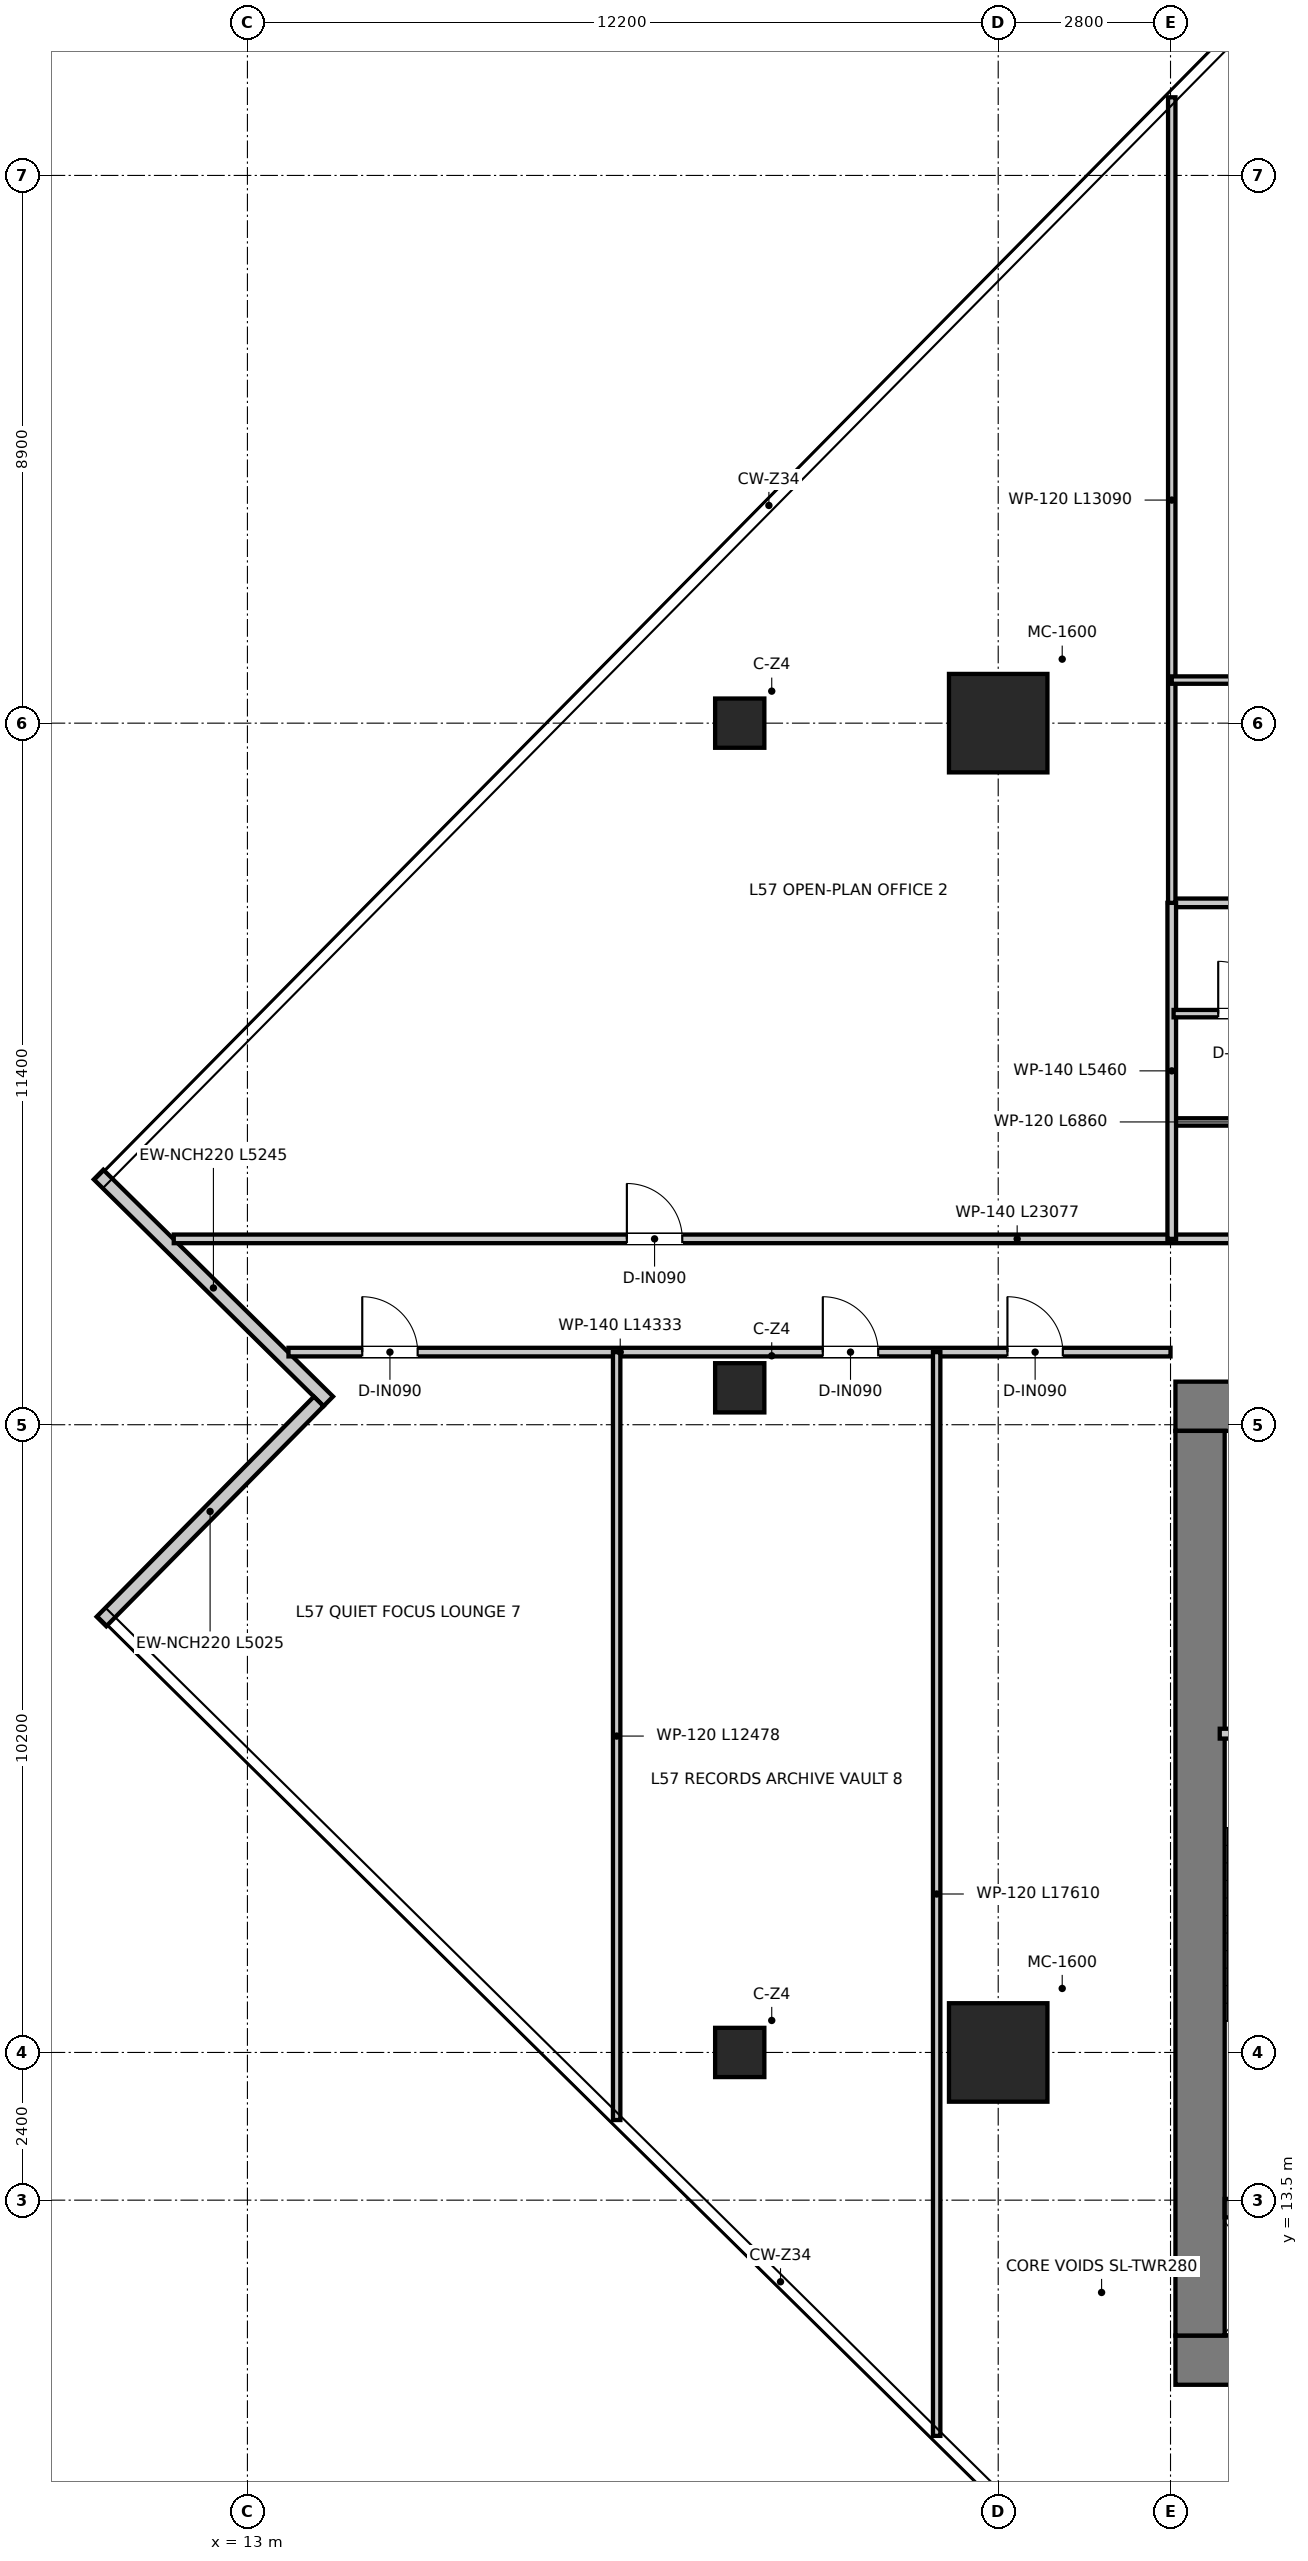
"""IFC4 building model, lengths in metres.
Left out: names, types, materials, properties, quantities, classifications, styles, units other than length and angle.
Written with IfcOpenShell. Run it as: python <this file> out.ifc"""

import sys

from ifc_helpers import new_model, si_unit, direction, frame, frame_2d, origin, origin_2d, place, context, subcontext, project, spatial, rectangle, extrude, source, transform, mapped, element, fill, save


model = new_model("IFC4")
c1 = context("Model", 3, precision=1e-05, world=origin(), true_north=direction((0.0, 1.0)))
c2 = subcontext(c1, "Body", "Model", "MODEL_VIEW")
j1 = project(units=[si_unit("LENGTHUNIT", "METRE"), si_unit("PLANEANGLEUNIT", "RADIAN")], contexts=[c1])
p1 = place(None, origin())
s1 = spatial("IfcSite", under=j1, at=p1, CompositionType="ELEMENT")
p2 = place(p1, origin())
s2 = spatial("IfcBuilding", under=s1, at=p2, CompositionType="ELEMENT")
p3 = place(p2, frame((0.0, 0.0, 234.95)))
s3 = spatial("IfcBuildingStorey", under=s2, at=p3, CompositionType="ELEMENT", Elevation=234.95)
p4 = place(p3, frame((28.08, 10.9, 0.0), z_axis=(0.0, 0.0, 1.0), x_axis=(1.0, 0.0, 0.0)))
e1 = element("IfcWall", 1, at=p4, inside=s3, PredefinedType="SHEAR", context=c2, shape_type="SweptSolid", body=[
    extrude(rectangle(XDim=15.84, YDim=0.8, at=frame_2d((7.92, 0.0))), origin(), (0.0, 0.0, 1.0), 3.95),
])
p5 = place(p3, frame((28.08, 26.4, 0.0), z_axis=(0.0, 0.0, 1.0), x_axis=(1.0, 0.0, 0.0)))
e2 = element("IfcWall", 2, at=p5, inside=s3, PredefinedType="SHEAR", context=c2, shape_type="SweptSolid", body=[
    extrude(rectangle(XDim=15.84, YDim=0.8, at=frame_2d((7.92, 0.0))), origin(), (0.0, 0.0, 1.0), 3.95),
])
p6 = place(p5, frame((7.22, 0.0, 0.0)))
e3 = element("IfcOpeningElement", 3, at=p6, cuts=e2, PredefinedType="OPENING", context=c2, shape_type="SweptSolid", body=[
    extrude(rectangle(XDim=1.4, YDim=2.2, at=frame_2d((0.7, 1.1))), frame((0.0, 0.41, 0.0), z_axis=(0.0, -1.0, 0.0), x_axis=(1.0, 0.0, 0.0)), (0.0, 0.0, 1.0), 0.82),
])
p7 = place(p5, frame((1.775, 0.0, 0.0)))
e4 = element("IfcOpeningElement", 4, at=p7, cuts=e2, PredefinedType="OPENING", context=c2, shape_type="SweptSolid", body=[
    extrude(rectangle(XDim=1.05, YDim=2.1, at=frame_2d((0.525, 1.05))), frame((0.0, 0.41, 0.0), z_axis=(0.0, -1.0, 0.0), x_axis=(1.0, 0.0, 0.0)), (0.0, 0.0, 1.0), 0.82),
])
p8 = place(p5, frame((13.015, 0.0, 0.0)))
e5 = element("IfcOpeningElement", 5, at=p8, cuts=e2, PredefinedType="OPENING", context=c2, shape_type="SweptSolid", body=[
    extrude(rectangle(XDim=1.05, YDim=2.1, at=frame_2d((0.525, 1.05))), frame((0.0, 0.41, 0.0), z_axis=(0.0, -1.0, 0.0), x_axis=(1.0, 0.0, 0.0)), (0.0, 0.0, 1.0), 0.82),
])
p9 = place(p3, frame((28.48, 11.3, 0.0), z_axis=(0.0, 0.0, 1.0), x_axis=(0.0, 1.0, 0.0)))
e6 = element("IfcWall", 6, at=p9, inside=s3, PredefinedType="SHEAR", context=c2, shape_type="SweptSolid", body=[
    extrude(rectangle(XDim=14.7, YDim=0.8, at=frame_2d((7.35, 0.0))), origin(), (0.0, 0.0, 1.0), 3.95),
])
p10 = place(p3, frame((28.88, 13.37, 0.0), z_axis=(0.0, 0.0, 1.0), x_axis=(1.0, 0.0, 0.0)))
e7 = element("IfcWall", 7, at=p10, inside=s3, PredefinedType="SHEAR", context=c2, shape_type="SweptSolid", body=[
    extrude(rectangle(XDim=3.1, YDim=0.3, at=frame_2d((1.55, 0.0))), origin(), (0.0, 0.0, 1.0), 3.95),
])
m1 = source(origin(), c2, "Body", "SweptSolid", [
    extrude(rectangle(XDim=1.6, YDim=1.6, at=origin_2d()), origin(), (0.0, 0.0, 1.0), 3.95),
])
for number, where, z_axis, x_axis in (
    (8, (25.2, 15.9, 0.0), (0.0, 0.0, 1.0), (1.0, 0.0, 0.0)),
    (9, (25.2, 37.5, 0.0), (0.0, 0.0, 1.0), (1.0, 0.0, 0.0)),
):
    element("IfcColumn", number, at=place(p3, frame(where, z_axis=z_axis, x_axis=x_axis)), inside=s3, PredefinedType="USERDEFINED", context=c2, shape_type="MappedRepresentation", body=[
        mapped(m1, transform((0.0, 0.0, 0.0), x_axis=(1.0, 0.0, 0.0), y_axis=(0.0, 1.0, 0.0), z_axis=(0.0, 0.0, 1.0), scale=1.0)),
    ])
m2 = source(origin(), c2, "Body", "SweptSolid", [
    extrude(rectangle(XDim=0.8, YDim=0.8, at=origin_2d()), origin(), (0.0, 0.0, 1.0), 3.95),
])
for number, where, z_axis, x_axis in (
    (10, (21.0, 15.9, 0.0), (0.0, 0.0, 1.0), (1.0, 0.0, 0.0)),
    (11, (21.0, 26.7, 0.0), (0.0, 0.0, 1.0), (1.0, 0.0, 0.0)),
    (12, (21.0, 37.5, 0.0), (0.0, 0.0, 1.0), (1.0, 0.0, 0.0)),
):
    element("IfcColumn", number, at=place(p3, frame(where, z_axis=z_axis, x_axis=x_axis)), inside=s3, PredefinedType="COLUMN", context=c2, shape_type="MappedRepresentation", body=[
        mapped(m2, transform((0.0, 0.0, 0.0), x_axis=(1.0, 0.0, 0.0), y_axis=(0.0, 1.0, 0.0), z_axis=(0.0, 0.0, 1.0), scale=1.0)),
    ])
p11 = place(p3, frame((10.581, 30.165, 0.0), z_axis=(0.0, 0.0, 1.0), x_axis=(0.711699894533, -0.702483636906, 0.0)))
e13 = element("IfcWall", 13, at=p11, inside=s3, PredefinedType="ELEMENTEDWALL", context=c2, shape_type="SweptSolid", body=[
    extrude(rectangle(XDim=5.245, YDim=0.22, at=frame_2d((2.623, 0.0))), origin(), (0.0, 0.0, 1.0), 3.67),
])
p12 = place(p3, frame((14.158, 26.479, 0.0), z_axis=(0.0, 0.0, 1.0), x_axis=(-0.702451626199, -0.711731489292, 0.0)))
e14 = element("IfcWall", 14, at=p12, inside=s3, PredefinedType="ELEMENTEDWALL", context=c2, shape_type="SweptSolid", body=[
    extrude(rectangle(XDim=5.025, YDim=0.22, at=frame_2d((2.512, 0.0))), origin(), (0.0, 0.0, 1.0), 3.67),
])
p13 = place(p3, frame((28.8, 21.08, 0.0), z_axis=(0.0, 0.0, 1.0), x_axis=(1.0, 0.0, 0.0)))
e15 = element("IfcWall", 15, at=p13, inside=s3, PredefinedType="PARTITIONING", context=c2, shape_type="SweptSolid", body=[
    extrude(rectangle(XDim=3.16, YDim=0.16, at=frame_2d((1.58, 0.0))), origin(), (0.0, 0.0, 1.0), 3.67),
])
p14 = place(p13, frame((1.055, 0.0, 0.0)))
e16 = element("IfcOpeningElement", 16, at=p14, cuts=e15, PredefinedType="OPENING", context=c2, shape_type="SweptSolid", body=[
    extrude(rectangle(XDim=1.05, YDim=2.1, at=frame_2d((0.525, 1.05))), frame((0.0, 0.09, 0.0), z_axis=(0.0, -1.0, 0.0), x_axis=(1.0, 0.0, 0.0)), (0.0, 0.0, 1.0), 0.18),
])
p15 = place(p3, frame((11.803, 29.12, 0.0), z_axis=(0.0, 0.0, 1.0), x_axis=(1.0, 0.0, 0.0)))
e17 = element("IfcWall", 17, at=p15, inside=s3, PredefinedType="PARTITIONING", context=c2, shape_type="SweptSolid", body=[
    extrude(rectangle(XDim=23.077, YDim=0.14, at=frame_2d((11.538, 0.0))), origin(), (0.0, 0.0, 1.0), 3.03),
])
p16 = place(p15, frame((19.147, 0.0, 0.0)))
e18 = element("IfcOpeningElement", 18, at=p16, cuts=e17, PredefinedType="OPENING", context=c2, shape_type="SweptSolid", body=[
    extrude(rectangle(XDim=0.9, YDim=2.1, at=frame_2d((0.45, 1.05))), frame((0.0, 0.08, 0.0), z_axis=(0.0, -1.0, 0.0), x_axis=(1.0, 0.0, 0.0)), (0.0, 0.0, 1.0), 0.16),
])
p17 = place(p15, frame((7.363, 0.0, 0.0)))
e19 = element("IfcOpeningElement", 19, at=p17, cuts=e17, PredefinedType="OPENING", context=c2, shape_type="SweptSolid", body=[
    extrude(rectangle(XDim=0.9, YDim=2.1, at=frame_2d((0.45, 1.05))), frame((0.0, 0.08, 0.0), z_axis=(0.0, -1.0, 0.0), x_axis=(1.0, 0.0, 0.0)), (0.0, 0.0, 1.0), 0.16),
])
p18 = place(p3, frame((13.667, 27.28, 0.0), z_axis=(0.0, 0.0, 1.0), x_axis=(1.0, 0.0, 0.0)))
e20 = element("IfcWall", 20, at=p18, inside=s3, PredefinedType="PARTITIONING", context=c2, shape_type="SweptSolid", body=[
    extrude(rectangle(XDim=14.333, YDim=0.14, at=frame_2d((7.166, 0.0))), origin(), (0.0, 0.0, 1.0), 3.03),
])
p19 = place(p18, frame((1.198, 0.0, 0.0)))
e21 = element("IfcOpeningElement", 21, at=p19, cuts=e20, PredefinedType="OPENING", context=c2, shape_type="SweptSolid", body=[
    extrude(rectangle(XDim=0.9, YDim=2.1, at=frame_2d((0.45, 1.05))), frame((0.0, 0.08, 0.0), z_axis=(0.0, -1.0, 0.0), x_axis=(1.0, 0.0, 0.0)), (0.0, 0.0, 1.0), 0.16),
])
p20 = place(p18, frame((8.683, 0.0, 0.0)))
e22 = element("IfcOpeningElement", 22, at=p20, cuts=e20, PredefinedType="OPENING", context=c2, shape_type="SweptSolid", body=[
    extrude(rectangle(XDim=0.9, YDim=2.1, at=frame_2d((0.45, 1.05))), frame((0.0, 0.08, 0.0), z_axis=(0.0, -1.0, 0.0), x_axis=(1.0, 0.0, 0.0)), (0.0, 0.0, 1.0), 0.16),
])
p21 = place(p18, frame((11.683, 0.0, 0.0)))
e23 = element("IfcOpeningElement", 23, at=p21, cuts=e20, PredefinedType="OPENING", context=c2, shape_type="SweptSolid", body=[
    extrude(rectangle(XDim=0.9, YDim=2.1, at=frame_2d((0.45, 1.05))), frame((0.0, 0.08, 0.0), z_axis=(0.0, -1.0, 0.0), x_axis=(1.0, 0.0, 0.0)), (0.0, 0.0, 1.0), 0.16),
])
p22 = place(p3, frame((28.02, 31.02, 0.0), z_axis=(0.0, 0.0, 1.0), x_axis=(1.0, 0.0, 0.0)))
e24 = element("IfcWall", 24, at=p22, inside=s3, PredefinedType="PARTITIONING", context=c2, shape_type="SweptSolid", body=[
    extrude(rectangle(XDim=6.86, YDim=0.12, at=frame_2d((3.43, 0.0))), origin(), (0.0, 0.0, 1.0), 3.18),
])
p23 = place(p3, frame((28.02, 34.58, 0.0), z_axis=(0.0, 0.0, 1.0), x_axis=(1.0, 0.0, 0.0)))
e25 = element("IfcWall", 25, at=p23, inside=s3, PredefinedType="PARTITIONING", context=c2, shape_type="SweptSolid", body=[
    extrude(rectangle(XDim=6.86, YDim=0.14, at=frame_2d((3.43, 0.0))), origin(), (0.0, 0.0, 1.0), 3.18),
])
p24 = place(p3, frame((28.02, 29.12, 0.0), z_axis=(0.0, 0.0, 1.0), x_axis=(0.0, 1.0, 0.0)))
e26 = element("IfcWall", 26, at=p24, inside=s3, PredefinedType="PARTITIONING", context=c2, shape_type="SweptSolid", body=[
    extrude(rectangle(XDim=5.46, YDim=0.14, at=frame_2d((2.73, 0.0))), origin(), (0.0, 0.0, 1.0), 3.37),
])
p25 = place(p3, frame((28.05, 32.78, 0.0), z_axis=(0.0, 0.0, 1.0), x_axis=(1.0, 0.0, 0.0)))
e27 = element("IfcWall", 27, at=p25, inside=s3, PredefinedType="PARTITIONING", context=c2, shape_type="SweptSolid", body=[
    extrude(rectangle(XDim=6.8, YDim=0.12, at=frame_2d((3.4, 0.0))), origin(), (0.0, 0.0, 1.0), 3.18),
])
p26 = place(p25, frame((0.725, 0.0, 0.0)))
e28 = element("IfcOpeningElement", 28, at=p26, cuts=e27, PredefinedType="OPENING", context=c2, shape_type="SweptSolid", body=[
    extrude(rectangle(XDim=0.85, YDim=2.1, at=frame_2d((0.425, 1.05))), frame((0.0, 0.07, 0.0), z_axis=(0.0, -1.0, 0.0), x_axis=(1.0, 0.0, 0.0)), (0.0, 0.0, 1.0), 0.14),
])
p27 = place(p25, frame((3.065, 0.0, 0.0)))
e29 = element("IfcOpeningElement", 29, at=p27, cuts=e27, PredefinedType="OPENING", context=c2, shape_type="SweptSolid", body=[
    extrude(rectangle(XDim=0.85, YDim=2.1, at=frame_2d((0.425, 1.05))), frame((0.0, 0.07, 0.0), z_axis=(0.0, -1.0, 0.0), x_axis=(1.0, 0.0, 0.0)), (0.0, 0.0, 1.0), 0.14),
])
p28 = place(p25, frame((5.25, 0.0, 0.0)))
e30 = element("IfcOpeningElement", 30, at=p28, cuts=e27, PredefinedType="OPENING", context=c2, shape_type="SweptSolid", body=[
    extrude(rectangle(XDim=0.9, YDim=2.1, at=frame_2d((0.45, 1.05))), frame((0.0, 0.07, 0.0), z_axis=(0.0, -1.0, 0.0), x_axis=(1.0, 0.0, 0.0)), (0.0, 0.0, 1.0), 0.14),
])
p29 = place(p3, frame((28.02, 34.58, 0.0), z_axis=(0.0, 0.0, 1.0), x_axis=(0.0, 1.0, 0.0)))
e31 = element("IfcWall", 31, at=p29, inside=s3, PredefinedType="PARTITIONING", context=c2, shape_type="SweptSolid", body=[
    extrude(rectangle(XDim=13.09, YDim=0.12, at=frame_2d((6.545, 0.0))), origin(), (0.0, 0.0, 1.0), 3.03),
])
p30 = place(p3, frame((28.02, 38.2, 0.0), z_axis=(0.0, 0.0, 1.0), x_axis=(1.0, 0.0, 0.0)))
e32 = element("IfcWall", 32, at=p30, inside=s3, PredefinedType="PARTITIONING", context=c2, shape_type="SweptSolid", body=[
    extrude(rectangle(XDim=6.86, YDim=0.12, at=frame_2d((3.43, 0.0))), origin(), (0.0, 0.0, 1.0), 3.18),
])
p31 = place(p3, frame((19.0, 14.802, 0.0), z_axis=(0.0, 0.0, 1.0), x_axis=(0.0, 1.0, 0.0)))
e33 = element("IfcWall", 33, at=p31, inside=s3, PredefinedType="PARTITIONING", context=c2, shape_type="SweptSolid", body=[
    extrude(rectangle(XDim=12.478, YDim=0.12, at=frame_2d((6.239, 0.0))), origin(), (0.0, 0.0, 1.0), 3.67),
])
p32 = place(p3, frame((24.2, 9.669, 0.0), z_axis=(0.0, 0.0, 1.0), x_axis=(0.0, 1.0, 0.0)))
e34 = element("IfcWall", 34, at=p32, inside=s3, PredefinedType="PARTITIONING", context=c2, shape_type="SweptSolid", body=[
    extrude(rectangle(XDim=17.611, YDim=0.12, at=frame_2d((8.805, 0.0))), origin(), (0.0, 0.0, 1.0), 3.18),
])
p33 = place(p26, origin())
e35 = element("IfcDoor", 35, at=p33, inside=s3, OperationType="SINGLE_SWING_LEFT", PredefinedType="DOOR", context=c2, shape_type="SweptSolid", body=[
    extrude(rectangle(XDim=0.85, YDim=2.1, at=frame_2d((0.425, 1.05))), frame((0.0, 0.025, 0.0), z_axis=(0.0, -1.0, 0.0), x_axis=(1.0, 0.0, 0.0)), (0.0, 0.0, 1.0), 0.05),
])
fill(e28, e35)
p34 = place(p17, origin())
e36 = element("IfcDoor", 36, at=p34, inside=s3, OperationType="SINGLE_SWING_LEFT", PredefinedType="DOOR", context=c2, shape_type="SweptSolid", body=[
    extrude(rectangle(XDim=0.9, YDim=2.1, at=frame_2d((0.45, 1.05))), frame((0.0, 0.025, 0.0), z_axis=(0.0, -1.0, 0.0), x_axis=(1.0, 0.0, 0.0)), (0.0, 0.0, 1.0), 0.05),
])
fill(e19, e36)
p35 = place(p19, origin())
e37 = element("IfcDoor", 37, at=p35, inside=s3, OperationType="SINGLE_SWING_LEFT", PredefinedType="DOOR", context=c2, shape_type="SweptSolid", body=[
    extrude(rectangle(XDim=0.9, YDim=2.1, at=frame_2d((0.45, 1.05))), frame((0.0, 0.025, 0.0), z_axis=(0.0, -1.0, 0.0), x_axis=(1.0, 0.0, 0.0)), (0.0, 0.0, 1.0), 0.05),
])
fill(e21, e37)
p36 = place(p20, origin())
e38 = element("IfcDoor", 38, at=p36, inside=s3, OperationType="SINGLE_SWING_LEFT", PredefinedType="DOOR", context=c2, shape_type="SweptSolid", body=[
    extrude(rectangle(XDim=0.9, YDim=2.1, at=frame_2d((0.45, 1.05))), frame((0.0, 0.025, 0.0), z_axis=(0.0, -1.0, 0.0), x_axis=(1.0, 0.0, 0.0)), (0.0, 0.0, 1.0), 0.05),
])
fill(e22, e38)
p37 = place(p21, origin())
e39 = element("IfcDoor", 39, at=p37, inside=s3, OperationType="SINGLE_SWING_LEFT", PredefinedType="DOOR", context=c2, shape_type="SweptSolid", body=[
    extrude(rectangle(XDim=0.9, YDim=2.1, at=frame_2d((0.45, 1.05))), frame((0.0, 0.025, 0.0), z_axis=(0.0, -1.0, 0.0), x_axis=(1.0, 0.0, 0.0)), (0.0, 0.0, 1.0), 0.05),
])
fill(e23, e39)
save(model, sys.argv[1])
